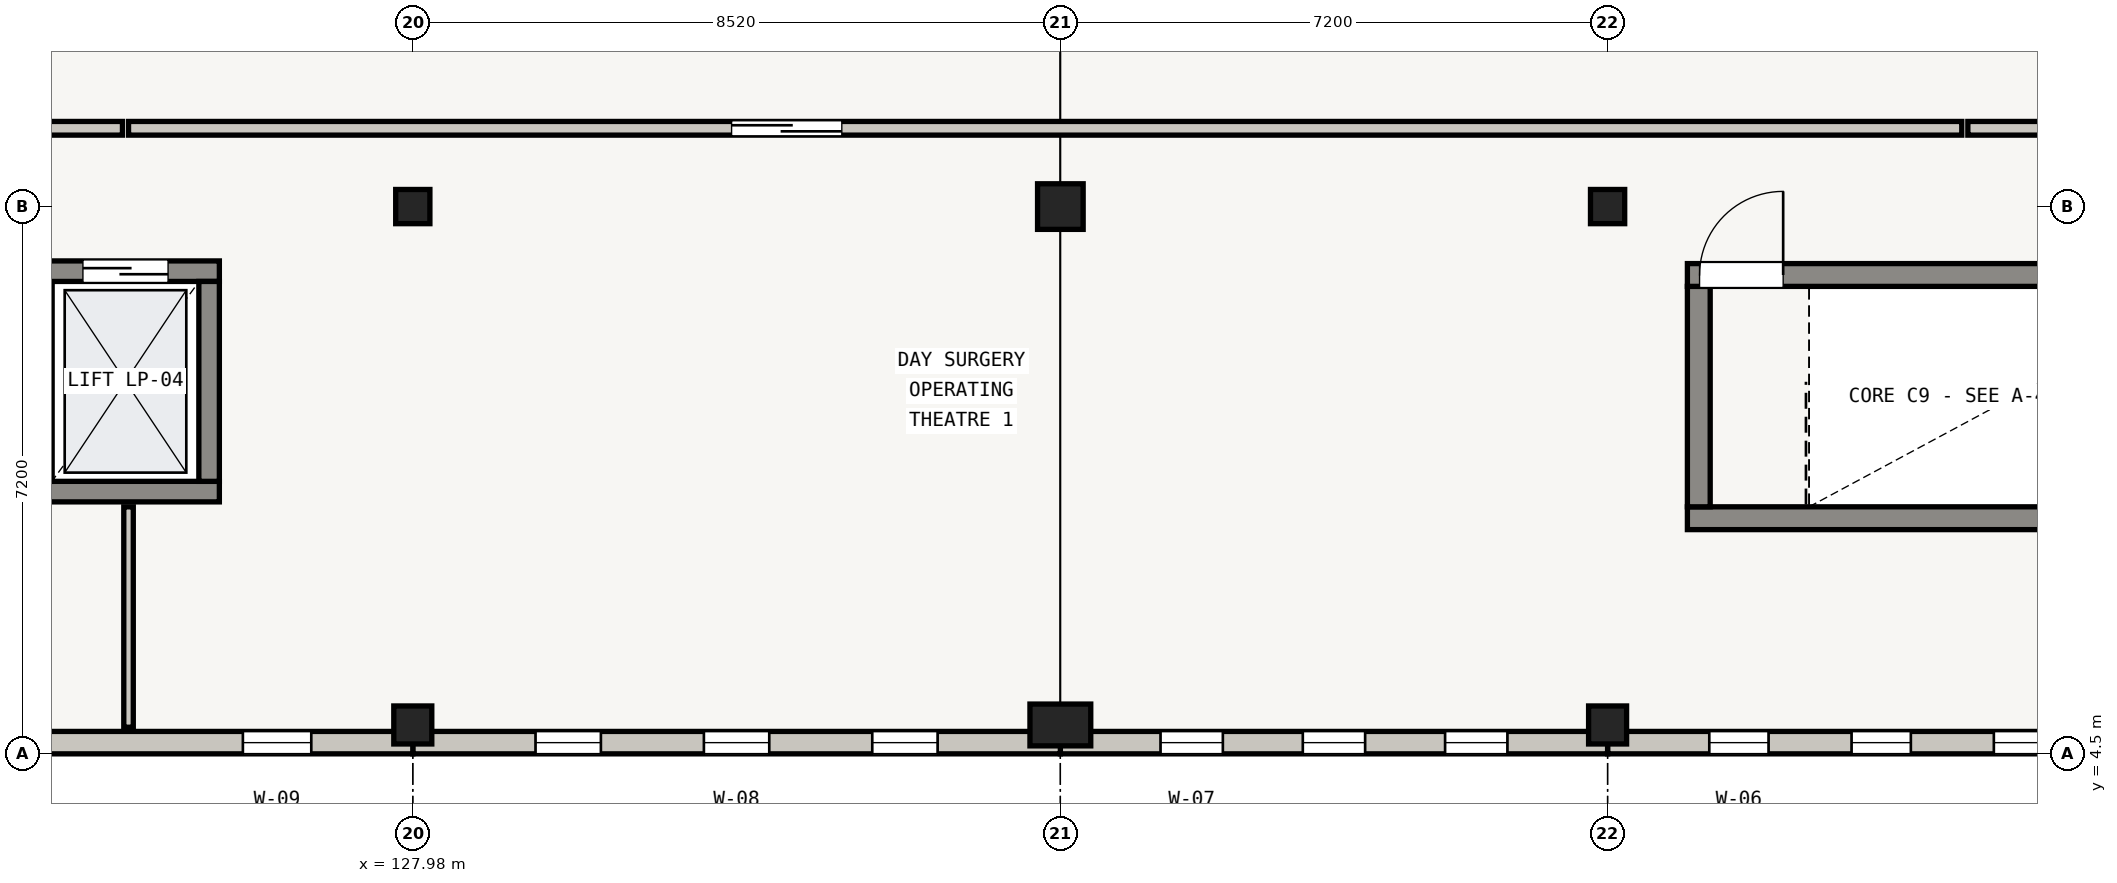
"""IFC4 building model, lengths in metres.
Left out: names, types, materials, properties, quantities, classifications, styles, units other than length and angle.
Written with IfcOpenShell. Run it as: python <this file> out.ifc"""

import sys

from ifc_helpers import new_model, si_unit, direction, frame, frame_2d, origin, origin_2d, place, context, subcontext, project, spatial, rectangle, extrude, element, fill, save


model = new_model("IFC4")
c1 = context("Model", 3, precision=1e-05, world=origin(), true_north=direction((0.0, 1.0)))
c2 = subcontext(c1, "Body", "Model", "MODEL_VIEW")
j1 = project(units=[si_unit("LENGTHUNIT", "METRE"), si_unit("PLANEANGLEUNIT", "RADIAN")], contexts=[c1])
p1 = place(None, origin())
s1 = spatial("IfcSite", under=j1, at=p1, CompositionType="ELEMENT")
p2 = place(p1, origin())
s2 = spatial("IfcBuilding", under=s1, at=p2, CompositionType="ELEMENT")
p3 = place(p2, frame((0.0, 0.0, 8.7)))
s3 = spatial("IfcBuildingStorey", under=s2, at=p3, CompositionType="ELEMENT", Elevation=8.7)
p4 = place(p3, frame((127.98, 4.88, 0.0), z_axis=(0.0, 0.0, 1.0), x_axis=(1.0, 0.0, 0.0)))
e1 = element("IfcColumn", 1, at=p4, inside=s3, PredefinedType="COLUMN", context=c2, shape_type="SweptSolid", body=[
    extrude(rectangle(XDim=0.5, YDim=0.5, at=origin_2d()), origin(), (0.0, 0.0, 1.0), 4.02),
])
p5 = place(p3, frame((127.98, 11.7, 0.0), z_axis=(0.0, 0.0, 1.0), x_axis=(1.0, 0.0, 0.0)))
e2 = element("IfcColumn", 2, at=p5, inside=s3, PredefinedType="COLUMN", context=c2, shape_type="SweptSolid", body=[
    extrude(rectangle(XDim=0.45, YDim=0.45, at=origin_2d()), origin(), (0.0, 0.0, 1.0), 4.02),
])
p6 = place(p3, frame((136.5, 4.88, 0.0), z_axis=(0.0, 0.0, 1.0), x_axis=(1.0, 0.0, 0.0)))
e3 = element("IfcColumn", 3, at=p6, inside=s3, PredefinedType="COLUMN", context=c2, shape_type="SweptSolid", body=[
    extrude(rectangle(XDim=0.8, YDim=0.55, at=origin_2d()), origin(), (0.0, 0.0, 1.0), 4.02),
])
p7 = place(p3, frame((136.5, 11.7, 0.0), z_axis=(0.0, 0.0, 1.0), x_axis=(1.0, 0.0, 0.0)))
e4 = element("IfcColumn", 4, at=p7, inside=s3, PredefinedType="COLUMN", context=c2, shape_type="SweptSolid", body=[
    extrude(rectangle(XDim=0.6, YDim=0.6, at=origin_2d()), origin(), (0.0, 0.0, 1.0), 4.02),
])
p8 = place(p3, frame((143.7, 4.88, 0.0), z_axis=(0.0, 0.0, 1.0), x_axis=(1.0, 0.0, 0.0)))
e5 = element("IfcColumn", 5, at=p8, inside=s3, PredefinedType="COLUMN", context=c2, shape_type="SweptSolid", body=[
    extrude(rectangle(XDim=0.5, YDim=0.5, at=origin_2d()), origin(), (0.0, 0.0, 1.0), 4.02),
])
p9 = place(p3, frame((143.7, 11.7, 0.0), z_axis=(0.0, 0.0, 1.0), x_axis=(1.0, 0.0, 0.0)))
e6 = element("IfcColumn", 6, at=p9, inside=s3, PredefinedType="COLUMN", context=c2, shape_type="SweptSolid", body=[
    extrude(rectangle(XDim=0.45, YDim=0.45, at=origin_2d()), origin(), (0.0, 0.0, 1.0), 4.02),
])
p10 = place(p3, frame((150.9, 4.647, 0.0), z_axis=(0.0, 0.0, 1.0), x_axis=(-1.0, 0.0, 0.0)))
e7 = element("IfcWall", 7, at=p10, inside=s3, PredefinedType="STANDARD", context=c2, shape_type="SweptSolid", body=[
    extrude(rectangle(XDim=7.2, YDim=0.295, at=frame_2d((3.6, 0.0))), origin(), (0.0, 0.0, 1.0), 3.632),
])
p11 = place(p10, frame((1.338, 0.0, 0.55)))
e8 = element("IfcOpeningElement", 8, at=p11, cuts=e7, PredefinedType="OPENING", context=c2, shape_type="SweptSolid", body=[
    extrude(rectangle(XDim=0.78, YDim=2.25, at=frame_2d((0.39, 1.125))), frame((0.0, 0.147, 0.0), z_axis=(0.0, -1.0, 0.0), x_axis=(1.0, 0.0, 0.0)), (0.0, 0.0, 1.0), 0.295),
])
p12 = place(p10, frame((3.21, 0.0, 0.55)))
e9 = element("IfcOpeningElement", 9, at=p12, cuts=e7, PredefinedType="OPENING", context=c2, shape_type="SweptSolid", body=[
    extrude(rectangle(XDim=0.78, YDim=2.25, at=frame_2d((0.39, 1.125))), frame((0.0, 0.147, 0.0), z_axis=(0.0, -1.0, 0.0), x_axis=(1.0, 0.0, 0.0)), (0.0, 0.0, 1.0), 0.295),
])
p13 = place(p10, frame((5.082, 0.0, 0.55)))
e10 = element("IfcOpeningElement", 10, at=p13, cuts=e7, PredefinedType="OPENING", context=c2, shape_type="SweptSolid", body=[
    extrude(rectangle(XDim=0.78, YDim=2.25, at=frame_2d((0.39, 1.125))), frame((0.0, 0.147, 0.0), z_axis=(0.0, -1.0, 0.0), x_axis=(1.0, 0.0, 0.0)), (0.0, 0.0, 1.0), 0.295),
])
p14 = place(p3, frame((143.7, 4.647, 0.0), z_axis=(0.0, 0.0, 1.0), x_axis=(-1.0, 0.0, 0.0)))
e11 = element("IfcWall", 11, at=p14, inside=s3, PredefinedType="STANDARD", context=c2, shape_type="SweptSolid", body=[
    extrude(rectangle(XDim=7.2, YDim=0.295, at=frame_2d((3.6, 0.0))), origin(), (0.0, 0.0, 1.0), 3.632),
])
p15 = place(p14, frame((1.318, 0.0, 0.55)))
e12 = element("IfcOpeningElement", 12, at=p15, cuts=e11, PredefinedType="OPENING", context=c2, shape_type="SweptSolid", body=[
    extrude(rectangle(XDim=0.82, YDim=2.2, at=frame_2d((0.41, 1.1))), frame((0.0, 0.147, 0.0), z_axis=(0.0, -1.0, 0.0), x_axis=(1.0, 0.0, 0.0)), (0.0, 0.0, 1.0), 0.295),
])
p16 = place(p14, frame((3.19, 0.0, 0.55)))
e13 = element("IfcOpeningElement", 13, at=p16, cuts=e11, PredefinedType="OPENING", context=c2, shape_type="SweptSolid", body=[
    extrude(rectangle(XDim=0.82, YDim=2.2, at=frame_2d((0.41, 1.1))), frame((0.0, 0.147, 0.0), z_axis=(0.0, -1.0, 0.0), x_axis=(1.0, 0.0, 0.0)), (0.0, 0.0, 1.0), 0.295),
])
p17 = place(p14, frame((5.062, 0.0, 0.55)))
e14 = element("IfcOpeningElement", 14, at=p17, cuts=e11, PredefinedType="OPENING", context=c2, shape_type="SweptSolid", body=[
    extrude(rectangle(XDim=0.82, YDim=2.2, at=frame_2d((0.41, 1.1))), frame((0.0, 0.147, 0.0), z_axis=(0.0, -1.0, 0.0), x_axis=(1.0, 0.0, 0.0)), (0.0, 0.0, 1.0), 0.295),
])
p18 = place(p3, frame((136.5, 4.647, 0.0), z_axis=(0.0, 0.0, 1.0), x_axis=(-1.0, 0.0, 0.0)))
e15 = element("IfcWall", 15, at=p18, inside=s3, PredefinedType="STANDARD", context=c2, shape_type="SweptSolid", body=[
    extrude(rectangle(XDim=8.52, YDim=0.295, at=frame_2d((4.26, 0.0))), origin(), (0.0, 0.0, 1.0), 3.632),
])
p19 = place(p18, frame((1.615, 0.0, 0.55)))
e16 = element("IfcOpeningElement", 16, at=p19, cuts=e15, PredefinedType="OPENING", context=c2, shape_type="SweptSolid", body=[
    extrude(rectangle(XDim=0.86, YDim=2.2, at=frame_2d((0.43, 1.1))), frame((0.0, 0.147, 0.0), z_axis=(0.0, -1.0, 0.0), x_axis=(1.0, 0.0, 0.0)), (0.0, 0.0, 1.0), 0.295),
])
p20 = place(p18, frame((3.83, 0.0, 0.55)))
e17 = element("IfcOpeningElement", 17, at=p20, cuts=e15, PredefinedType="OPENING", context=c2, shape_type="SweptSolid", body=[
    extrude(rectangle(XDim=0.86, YDim=2.2, at=frame_2d((0.43, 1.1))), frame((0.0, 0.147, 0.0), z_axis=(0.0, -1.0, 0.0), x_axis=(1.0, 0.0, 0.0)), (0.0, 0.0, 1.0), 0.295),
])
p21 = place(p18, frame((6.045, 0.0, 0.55)))
e18 = element("IfcOpeningElement", 18, at=p21, cuts=e15, PredefinedType="OPENING", context=c2, shape_type="SweptSolid", body=[
    extrude(rectangle(XDim=0.86, YDim=2.2, at=frame_2d((0.43, 1.1))), frame((0.0, 0.147, 0.0), z_axis=(0.0, -1.0, 0.0), x_axis=(1.0, 0.0, 0.0)), (0.0, 0.0, 1.0), 0.295),
])
p22 = place(p3, frame((127.98, 4.647, 0.0), z_axis=(0.0, 0.0, 1.0), x_axis=(-1.0, 0.0, 0.0)))
e19 = element("IfcWall", 19, at=p22, inside=s3, PredefinedType="STANDARD", context=c2, shape_type="SweptSolid", body=[
    extrude(rectangle(XDim=7.44, YDim=0.295, at=frame_2d((3.72, 0.0))), origin(), (0.0, 0.0, 1.0), 3.632),
])
p23 = place(p22, frame((1.336, 0.0, 0.55)))
e20 = element("IfcOpeningElement", 20, at=p23, cuts=e19, PredefinedType="OPENING", context=c2, shape_type="SweptSolid", body=[
    extrude(rectangle(XDim=0.9, YDim=2.18, at=frame_2d((0.45, 1.09))), frame((0.0, 0.147, 0.0), z_axis=(0.0, -1.0, 0.0), x_axis=(1.0, 0.0, 0.0)), (0.0, 0.0, 1.0), 0.295),
])
p24 = place(p22, frame((5.204, 0.0, 0.55)))
e21 = element("IfcOpeningElement", 21, at=p24, cuts=e19, PredefinedType="OPENING", context=c2, shape_type="SweptSolid", body=[
    extrude(rectangle(XDim=0.9, YDim=2.18, at=frame_2d((0.45, 1.09))), frame((0.0, 0.147, 0.0), z_axis=(0.0, -1.0, 0.0), x_axis=(1.0, 0.0, 0.0)), (0.0, 0.0, 1.0), 0.295),
])
p25 = place(p3, frame((125.435, 7.95, 0.0), z_axis=(0.0, 0.0, 1.0), x_axis=(-1.0, 0.0, 0.0)))
e22 = element("IfcWall", 22, at=p25, inside=s3, PredefinedType="SHEAR", context=c2, shape_type="SweptSolid", body=[
    extrude(rectangle(XDim=2.47, YDim=0.27, at=frame_2d((1.235, 0.0))), origin(), (0.0, 0.0, 1.0), 3.905),
])
p26 = place(p3, frame((122.965, 10.85, 0.0), z_axis=(0.0, 0.0, 1.0), x_axis=(1.0, 0.0, 0.0)))
e23 = element("IfcWall", 23, at=p26, inside=s3, PredefinedType="SHEAR", context=c2, shape_type="SweptSolid", body=[
    extrude(rectangle(XDim=2.47, YDim=0.27, at=frame_2d((1.235, 0.0))), origin(), (0.0, 0.0, 1.0), 3.905),
])
p27 = place(p26, frame((0.675, 0.0, 0.0)))
e24 = element("IfcOpeningElement", 24, at=p27, cuts=e23, PredefinedType="OPENING", context=c2, shape_type="SweptSolid", body=[
    extrude(rectangle(XDim=1.12, YDim=2.1, at=frame_2d((0.56, 1.05))), frame((0.0, 0.135, 0.0), z_axis=(0.0, -1.0, 0.0), x_axis=(1.0, 0.0, 0.0)), (0.0, 0.0, 1.0), 0.27),
])
p28 = place(p3, frame((125.3, 10.715, 0.0), z_axis=(0.0, 0.0, 1.0), x_axis=(0.0, -1.0, 0.0)))
e25 = element("IfcWall", 25, at=p28, inside=s3, PredefinedType="SHEAR", context=c2, shape_type="SweptSolid", body=[
    extrude(rectangle(XDim=2.63, YDim=0.27, at=frame_2d((1.315, 0.0))), origin(), (0.0, 0.0, 1.0), 3.905),
])
p29 = place(p3, frame((152.05, 7.6, 0.0), z_axis=(0.0, 0.0, 1.0), x_axis=(-1.0, 0.0, 0.0)))
e26 = element("IfcWall", 26, at=p29, inside=s3, PredefinedType="SHEAR", context=c2, shape_type="SweptSolid", body=[
    extrude(rectangle(XDim=7.3, YDim=0.3, at=frame_2d((3.65, 0.0))), origin(), (0.0, 0.0, 1.0), 3.905),
])
p30 = place(p3, frame((144.9, 7.75, 0.0), z_axis=(0.0, 0.0, 1.0), x_axis=(0.0, 1.0, 0.0)))
e27 = element("IfcWall", 27, at=p30, inside=s3, PredefinedType="SHEAR", context=c2, shape_type="SweptSolid", body=[
    extrude(rectangle(XDim=2.9, YDim=0.3, at=frame_2d((1.45, 0.0))), origin(), (0.0, 0.0, 1.0), 3.905),
])
p31 = place(p3, frame((144.75, 10.8, 0.0), z_axis=(0.0, 0.0, 1.0), x_axis=(1.0, 0.0, 0.0)))
e28 = element("IfcWall", 28, at=p31, inside=s3, PredefinedType="SHEAR", context=c2, shape_type="SweptSolid", body=[
    extrude(rectangle(XDim=7.3, YDim=0.3, at=frame_2d((3.65, 0.0))), origin(), (0.0, 0.0, 1.0), 3.905),
])
p32 = place(p31, frame((0.16, 0.0, 0.0)))
e29 = element("IfcOpeningElement", 29, at=p32, cuts=e28, PredefinedType="OPENING", context=c2, shape_type="SweptSolid", body=[
    extrude(rectangle(XDim=1.1, YDim=2.05, at=frame_2d((0.55, 1.025))), frame((0.0, 0.15, 0.0), z_axis=(0.0, -1.0, 0.0), x_axis=(1.0, 0.0, 0.0)), (0.0, 0.0, 1.0), 0.3),
])
p33 = place(p3, frame((124.24, 12.73, 0.0), z_axis=(0.0, 0.0, 1.0), x_axis=(1.0, 0.0, 0.0)))
e30 = element("IfcWall", 30, at=p33, inside=s3, PredefinedType="PARTITIONING", context=c2, shape_type="SweptSolid", body=[
    extrude(rectangle(XDim=24.12, YDim=0.18, at=frame_2d((12.06, 0.0))), origin(), (0.0, 0.0, 1.0), 2.925),
])
p34 = place(p33, frame((7.935, 0.0, 0.0)))
e31 = element("IfcOpeningElement", 31, at=p34, cuts=e30, PredefinedType="OPENING", context=c2, shape_type="SweptSolid", body=[
    extrude(rectangle(XDim=1.45, YDim=2.1, at=frame_2d((0.725, 1.05))), frame((0.0, 0.09, 0.0), z_axis=(0.0, -1.0, 0.0), x_axis=(1.0, 0.0, 0.0)), (0.0, 0.0, 1.0), 0.18),
])
p35 = place(p3, frame((124.24, 4.85, 0.0), z_axis=(0.0, 0.0, 1.0), x_axis=(0.0, 1.0, 0.0)))
e32 = element("IfcWall", 32, at=p35, inside=s3, PredefinedType="PARTITIONING", context=c2, shape_type="SweptSolid", body=[
    extrude(rectangle(XDim=2.9, YDim=0.125, at=frame_2d((1.45, 0.0))), origin(), (0.0, 0.0, 1.0), 2.925),
])
p36 = place(p3, frame((148.44, 12.73, 0.0), z_axis=(0.0, 0.0, 1.0), x_axis=(1.0, 0.0, 0.0)))
e33 = element("IfcWall", 33, at=p36, inside=s3, PredefinedType="PARTITIONING", context=c2, shape_type="SweptSolid", body=[
    extrude(rectangle(XDim=16.51, YDim=0.18, at=frame_2d((8.255, 0.0))), origin(), (0.0, 0.0, 1.0), 2.925),
])
p37 = place(p36, frame((7.53, 0.0, 0.0)))
e34 = element("IfcOpeningElement", 34, at=p37, cuts=e33, PredefinedType="OPENING", context=c2, shape_type="SweptSolid", body=[
    extrude(rectangle(XDim=1.45, YDim=2.1, at=frame_2d((0.725, 1.05))), frame((0.0, 0.09, 0.0), z_axis=(0.0, -1.0, 0.0), x_axis=(1.0, 0.0, 0.0)), (0.0, 0.0, 1.0), 0.18),
])
p38 = place(p3, frame((117.84, 12.73, 0.0), z_axis=(0.0, 0.0, 1.0), x_axis=(1.0, 0.0, 0.0)))
e35 = element("IfcWall", 35, at=p38, inside=s3, PredefinedType="PARTITIONING", context=c2, shape_type="SweptSolid", body=[
    extrude(rectangle(XDim=6.32, YDim=0.18, at=frame_2d((3.16, 0.0))), origin(), (0.0, 0.0, 1.0), 2.925),
])
p39 = place(p38, frame((3.653, 0.0, 0.0)))
e36 = element("IfcOpeningElement", 36, at=p39, cuts=e35, PredefinedType="OPENING", context=c2, shape_type="SweptSolid", body=[
    extrude(rectangle(XDim=1.45, YDim=2.1, at=frame_2d((0.725, 1.05))), frame((0.0, 0.09, 0.0), z_axis=(0.0, -1.0, 0.0), x_axis=(1.0, 0.0, 0.0)), (0.0, 0.0, 1.0), 0.18),
])
p40 = place(p11, origin())
e37 = element("IfcWindow", 37, at=p40, inside=s3, PartitioningType="SINGLE_PANEL", PredefinedType="WINDOW", context=c2, shape_type="SweptSolid", body=[
    extrude(rectangle(XDim=0.78, YDim=2.25, at=frame_2d((0.39, 1.125))), frame((0.0, 0.03, 0.0), z_axis=(0.0, -1.0, 0.0), x_axis=(1.0, 0.0, 0.0)), (0.0, 0.0, 1.0), 0.06),
])
fill(e8, e37)
p41 = place(p12, origin())
e38 = element("IfcWindow", 38, at=p41, inside=s3, PartitioningType="SINGLE_PANEL", PredefinedType="WINDOW", context=c2, shape_type="SweptSolid", body=[
    extrude(rectangle(XDim=0.78, YDim=2.25, at=frame_2d((0.39, 1.125))), frame((0.0, 0.03, 0.0), z_axis=(0.0, -1.0, 0.0), x_axis=(1.0, 0.0, 0.0)), (0.0, 0.0, 1.0), 0.06),
])
fill(e9, e38)
p42 = place(p13, origin())
e39 = element("IfcWindow", 39, at=p42, inside=s3, PartitioningType="SINGLE_PANEL", PredefinedType="WINDOW", context=c2, shape_type="SweptSolid", body=[
    extrude(rectangle(XDim=0.78, YDim=2.25, at=frame_2d((0.39, 1.125))), frame((0.0, 0.03, 0.0), z_axis=(0.0, -1.0, 0.0), x_axis=(1.0, 0.0, 0.0)), (0.0, 0.0, 1.0), 0.06),
])
fill(e10, e39)
p43 = place(p15, origin())
e40 = element("IfcWindow", 40, at=p43, inside=s3, PartitioningType="SINGLE_PANEL", PredefinedType="WINDOW", context=c2, shape_type="SweptSolid", body=[
    extrude(rectangle(XDim=0.82, YDim=2.2, at=frame_2d((0.41, 1.1))), frame((0.0, 0.03, 0.0), z_axis=(0.0, -1.0, 0.0), x_axis=(1.0, 0.0, 0.0)), (0.0, 0.0, 1.0), 0.06),
])
fill(e12, e40)
p44 = place(p16, origin())
e41 = element("IfcWindow", 41, at=p44, inside=s3, PartitioningType="SINGLE_PANEL", PredefinedType="WINDOW", context=c2, shape_type="SweptSolid", body=[
    extrude(rectangle(XDim=0.82, YDim=2.2, at=frame_2d((0.41, 1.1))), frame((0.0, 0.03, 0.0), z_axis=(0.0, -1.0, 0.0), x_axis=(1.0, 0.0, 0.0)), (0.0, 0.0, 1.0), 0.06),
])
fill(e13, e41)
p45 = place(p17, origin())
e42 = element("IfcWindow", 42, at=p45, inside=s3, PartitioningType="SINGLE_PANEL", PredefinedType="WINDOW", context=c2, shape_type="SweptSolid", body=[
    extrude(rectangle(XDim=0.82, YDim=2.2, at=frame_2d((0.41, 1.1))), frame((0.0, 0.03, 0.0), z_axis=(0.0, -1.0, 0.0), x_axis=(1.0, 0.0, 0.0)), (0.0, 0.0, 1.0), 0.06),
])
fill(e14, e42)
p46 = place(p19, origin())
e43 = element("IfcWindow", 43, at=p46, inside=s3, PartitioningType="SINGLE_PANEL", PredefinedType="WINDOW", context=c2, shape_type="SweptSolid", body=[
    extrude(rectangle(XDim=0.86, YDim=2.2, at=frame_2d((0.43, 1.1))), frame((0.0, 0.03, 0.0), z_axis=(0.0, -1.0, 0.0), x_axis=(1.0, 0.0, 0.0)), (0.0, 0.0, 1.0), 0.06),
])
fill(e16, e43)
p47 = place(p20, origin())
e44 = element("IfcWindow", 44, at=p47, inside=s3, PartitioningType="SINGLE_PANEL", PredefinedType="WINDOW", context=c2, shape_type="SweptSolid", body=[
    extrude(rectangle(XDim=0.86, YDim=2.2, at=frame_2d((0.43, 1.1))), frame((0.0, 0.03, 0.0), z_axis=(0.0, -1.0, 0.0), x_axis=(1.0, 0.0, 0.0)), (0.0, 0.0, 1.0), 0.06),
])
fill(e17, e44)
p48 = place(p21, origin())
e45 = element("IfcWindow", 45, at=p48, inside=s3, PartitioningType="SINGLE_PANEL", PredefinedType="WINDOW", context=c2, shape_type="SweptSolid", body=[
    extrude(rectangle(XDim=0.86, YDim=2.2, at=frame_2d((0.43, 1.1))), frame((0.0, 0.03, 0.0), z_axis=(0.0, -1.0, 0.0), x_axis=(1.0, 0.0, 0.0)), (0.0, 0.0, 1.0), 0.06),
])
fill(e18, e45)
p49 = place(p23, origin())
e46 = element("IfcWindow", 46, at=p49, inside=s3, PartitioningType="DOUBLE_PANEL_VERTICAL", PredefinedType="WINDOW", context=c2, shape_type="SweptSolid", body=[
    extrude(rectangle(XDim=0.9, YDim=2.18, at=frame_2d((0.45, 1.09))), frame((0.0, 0.03, 0.0), z_axis=(0.0, -1.0, 0.0), x_axis=(1.0, 0.0, 0.0)), (0.0, 0.0, 1.0), 0.06),
])
fill(e20, e46)
p50 = place(p27, origin())
e47 = element("IfcDoor", 47, at=p50, inside=s3, OperationType="DOUBLE_DOOR_SLIDING", PredefinedType="DOOR", context=c2, shape_type="SweptSolid", body=[
    extrude(rectangle(XDim=1.12, YDim=2.1, at=frame_2d((0.56, 1.05))), frame((0.0, 0.025, 0.0), z_axis=(0.0, -1.0, 0.0), x_axis=(1.0, 0.0, 0.0)), (0.0, 0.0, 1.0), 0.05),
])
fill(e24, e47)
p51 = place(p32, origin())
e48 = element("IfcDoor", 48, at=p51, inside=s3, OperationType="SINGLE_SWING_RIGHT", PredefinedType="DOOR", context=c2, shape_type="SweptSolid", body=[
    extrude(rectangle(XDim=1.1, YDim=2.05, at=frame_2d((0.55, 1.025))), frame((0.0, 0.025, 0.0), z_axis=(0.0, -1.0, 0.0), x_axis=(1.0, 0.0, 0.0)), (0.0, 0.0, 1.0), 0.05),
])
fill(e29, e48)
p52 = place(p34, origin())
e49 = element("IfcDoor", 49, at=p52, inside=s3, OperationType="SLIDING_TO_LEFT", PredefinedType="DOOR", context=c2, shape_type="SweptSolid", body=[
    extrude(rectangle(XDim=1.45, YDim=2.1, at=frame_2d((0.725, 1.05))), frame((0.0, 0.025, 0.0), z_axis=(0.0, -1.0, 0.0), x_axis=(1.0, 0.0, 0.0)), (0.0, 0.0, 1.0), 0.05),
])
fill(e31, e49)
save(model, sys.argv[1])
